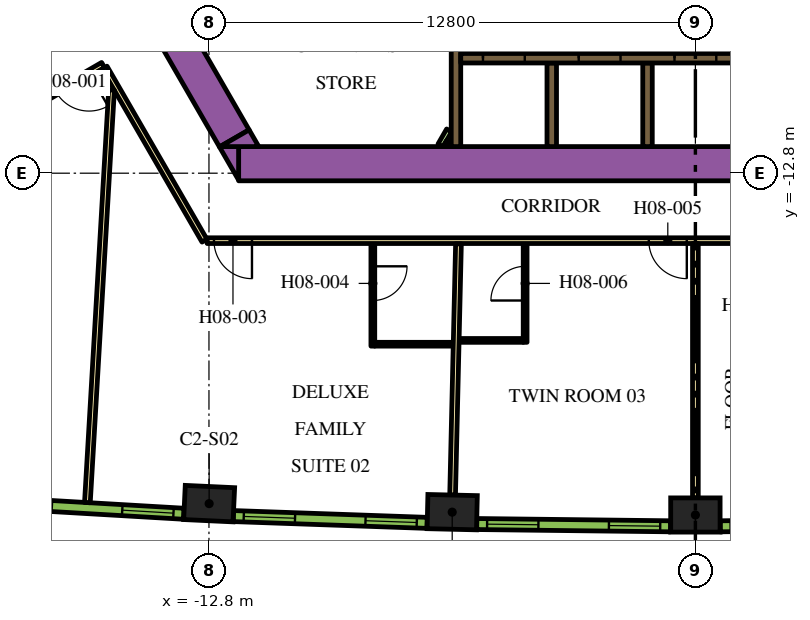
"""IFC4 building model, lengths in metres.
Left out: names, types, materials, properties, quantities, classifications, styles, units other than length and angle.
Written with IfcOpenShell. Run it as: python <this file> out.ifc"""

import sys

from ifc_helpers import new_model, si_unit, direction, frame, frame_2d, origin, origin_2d, place, context, subcontext, project, spatial, polyline, rectangle, outline, extrude, element, fill, save


model = new_model("IFC4")
c1 = context("Model", 3, precision=1e-05, world=origin(), true_north=direction((0.0, 1.0)))
c2 = subcontext(c1, "Body", "Model", "MODEL_VIEW")
j1 = project(units=[si_unit("LENGTHUNIT", "METRE"), si_unit("PLANEANGLEUNIT", "RADIAN")], contexts=[c1])
p1 = place(None, origin())
s1 = spatial("IfcSite", under=j1, at=p1, CompositionType="ELEMENT")
p2 = place(p1, origin())
s2 = spatial("IfcBuilding", under=s1, at=p2, CompositionType="ELEMENT")
p3 = place(p2, frame((0.0, 0.0, 114.9)))
s3 = spatial("IfcBuildingStorey", under=s2, at=p3, CompositionType="ELEMENT", Elevation=114.9)
for number, where, z_axis, x_axis in (
    (1, (-12.795, -21.494, 0.0), (0.0, 0.0, 1.0), (0.999, -0.047, 0.0)),
    (2, (-6.399, -21.719, 0.0), (0.0, 0.0, 1.0), (1.0, -0.023, 0.0)),
    (3, (0.0, -21.794, 0.0), (0.0, 0.0, 1.0), (1.0, 0.0, 0.0)),
):
    element("IfcColumn", number, at=place(p3, frame(where, z_axis=z_axis, x_axis=x_axis)), inside=s3, PredefinedType="COLUMN", context=c2, shape_type="SweptSolid", body=[
        extrude(rectangle(XDim=1.3, YDim=0.9, at=origin_2d()), origin(), (0.0, 0.0, 1.0), 3.9),
    ])
p4 = place(p3, frame((-12.019, -12.55, 0.0), z_axis=(0.0, 0.0, 1.0), x_axis=(1.0, 0.0, 0.0)))
e4 = element("IfcWall", 4, at=p4, inside=s3, PredefinedType="SOLIDWALL", context=c2, shape_type="SweptSolid", body=[
    extrude(rectangle(XDim=22.083, YDim=0.9, at=frame_2d((11.042, 0.0))), origin(), (0.0, 0.0, 1.0), 3.9),
])
p5 = place(p3, origin())
e5 = element("IfcWall", 5, at=p5, inside=s3, PredefinedType="SOLIDWALL", context=c2, shape_type="SweptSolid", body=[
    extrude(outline(polyline([(-12.529, -12.1), (-12.021, -12.1), (-12.021, -12.98), (-12.529, -12.1)])), origin(), (0.0, 0.0, 1.0), 3.9),
])
p6 = place(p3, frame((-12.134, -11.883, 0.0), z_axis=(0.0, 0.0, 1.0), x_axis=(-0.500005339912, 0.866022320763, 0.0)))
e6 = element("IfcWall", 6, at=p6, inside=s3, PredefinedType="SOLIDWALL", context=c2, shape_type="SweptSolid", body=[
    extrude(rectangle(XDim=9.488, YDim=0.9, at=frame_2d((4.744, 0.0))), origin(), (0.0, 0.0, 1.0), 3.9),
])
e7 = element("IfcWall", 7, at=p5, inside=s3, PredefinedType="SOLIDWALL", context=c2, shape_type="SweptSolid", body=[
    extrude(outline(polyline([(-11.489, -12.1), (-12.505, -12.1), (-11.743, -11.66), (-11.489, -12.1)])), origin(), (0.0, 0.0, 1.0), 3.9),
])
p7 = place(p3, frame((-3.78, -12.1, 0.0), z_axis=(0.0, 0.0, 1.0), x_axis=(0.0, 1.0, 0.0)))
e8 = element("IfcWall", 8, at=p7, inside=s3, PredefinedType="SOLIDWALL", context=c2, shape_type="SweptSolid", body=[
    extrude(rectangle(XDim=2.2, YDim=0.25, at=frame_2d((1.1, 0.0))), origin(), (0.0, 0.0, 1.0), 3.9),
])
p8 = place(p3, frame((-6.3, -12.1, 0.0), z_axis=(0.0, 0.0, 1.0), x_axis=(0.0, 1.0, 0.0)))
e9 = element("IfcWall", 9, at=p8, inside=s3, PredefinedType="SOLIDWALL", context=c2, shape_type="SweptSolid", body=[
    extrude(rectangle(XDim=3.146, YDim=0.25, at=frame_2d((1.573, 0.0))), origin(), (0.0, 0.0, 1.0), 3.9),
])
p9 = place(p3, frame((-1.26, -12.1, 0.0), z_axis=(0.0, 0.0, 1.0), x_axis=(0.0, 1.0, 0.0)))
e10 = element("IfcWall", 10, at=p9, inside=s3, PredefinedType="SOLIDWALL", context=c2, shape_type="SweptSolid", body=[
    extrude(rectangle(XDim=2.2, YDim=0.25, at=frame_2d((1.1, 0.0))), origin(), (0.0, 0.0, 1.0), 3.9),
])
p10 = place(p3, frame((-6.708, -12.068, 0.0), z_axis=(0.0, 0.0, 1.0), x_axis=(0.500000789788, 0.8660249478, 0.0)))
e11 = element("IfcWall", 11, at=p10, inside=s3, PredefinedType="PARTITIONING", context=c2, shape_type="SweptSolid", body=[
    extrude(rectangle(XDim=0.456, YDim=0.15, at=frame_2d((0.228, 0.0))), origin(), (0.0, 0.0, 1.0), 2.75),
])
p11 = place(p3, frame((-6.534, -12.068, 0.0), z_axis=(0.0, 0.0, 1.0), x_axis=(0.500240224089, 0.865886665912, 0.0)))
e12 = element("IfcWall", 12, at=p11, inside=s3, PredefinedType="PARTITIONING", context=c2, shape_type="SweptSolid", body=[
    extrude(rectangle(XDim=0.109, YDim=0.15, at=frame_2d((0.054, 0.0))), origin(), (0.0, 0.0, 1.0), 2.75),
])
p12 = place(p3, frame((-6.175, -9.775, 0.0), z_axis=(0.0, 0.0, 1.0), x_axis=(1.0, 0.0, 0.0)))
e13 = element("IfcWall", 13, at=p12, inside=s3, PredefinedType="SOLIDWALL", context=c2, shape_type="SweptSolid", body=[
    extrude(rectangle(XDim=12.35, YDim=0.25, at=frame_2d((6.175, 0.0))), origin(), (0.0, 0.0, 1.0), 3.9),
])
p13 = place(p12, frame((0.585, 0.0, 0.0)))
e14 = element("IfcOpeningElement", 14, at=p13, cuts=e13, PredefinedType="OPENING", context=c2, shape_type="SweptSolid", body=[
    extrude(rectangle(XDim=1.1, YDim=2.1, at=frame_2d((0.55, 1.05))), frame((0.0, 0.135, 0.0), z_axis=(0.0, -1.0, 0.0), x_axis=(1.0, 0.0, 0.0)), (0.0, 0.0, 1.0), 0.27),
])
p14 = place(p12, frame((3.105, 0.0, 0.0)))
e15 = element("IfcOpeningElement", 15, at=p14, cuts=e13, PredefinedType="OPENING", context=c2, shape_type="SweptSolid", body=[
    extrude(rectangle(XDim=1.1, YDim=2.1, at=frame_2d((0.55, 1.05))), frame((0.0, 0.135, 0.0), z_axis=(0.0, -1.0, 0.0), x_axis=(1.0, 0.0, 0.0)), (0.0, 0.0, 1.0), 0.27),
])
p15 = place(p12, frame((5.625, 0.0, 0.0)))
e16 = element("IfcOpeningElement", 16, at=p15, cuts=e13, PredefinedType="OPENING", context=c2, shape_type="SweptSolid", body=[
    extrude(rectangle(XDim=1.1, YDim=2.1, at=frame_2d((0.55, 1.05))), frame((0.0, 0.135, 0.0), z_axis=(0.0, -1.0, 0.0), x_axis=(1.0, 0.0, 0.0)), (0.0, 0.0, 1.0), 0.27),
])
p16 = place(p12, frame((8.145, 0.0, 0.0)))
e17 = element("IfcOpeningElement", 17, at=p16, cuts=e13, PredefinedType="OPENING", context=c2, shape_type="SweptSolid", body=[
    extrude(rectangle(XDim=1.1, YDim=2.1, at=frame_2d((0.55, 1.05))), frame((0.0, 0.135, 0.0), z_axis=(0.0, -1.0, 0.0), x_axis=(1.0, 0.0, 0.0)), (0.0, 0.0, 1.0), 0.27),
])
p17 = place(p12, frame((10.665, 0.0, 0.0)))
e18 = element("IfcOpeningElement", 18, at=p17, cuts=e13, PredefinedType="OPENING", context=c2, shape_type="SweptSolid", body=[
    extrude(rectangle(XDim=1.1, YDim=2.1, at=frame_2d((0.55, 1.05))), frame((0.0, 0.135, 0.0), z_axis=(0.0, -1.0, 0.0), x_axis=(1.0, 0.0, 0.0)), (0.0, 0.0, 1.0), 0.27),
])
p18 = place(p3, frame((-28.211, -15.335, 0.0), z_axis=(0.0, 0.0, 1.0), x_axis=(0.866025884867, 0.49999916674, 0.0)))
e19 = element("IfcWall", 19, at=p18, inside=s3, PredefinedType="PARTITIONING", context=c2, shape_type="SweptSolid", body=[
    extrude(rectangle(XDim=13.543, YDim=0.15, at=frame_2d((6.772, 0.0))), origin(), (0.0, 0.0, 1.0), 2.75),
])
p19 = place(p18, frame((12.114, 0.0, 0.0)))
e20 = element("IfcOpeningElement", 20, at=p19, cuts=e19, PredefinedType="OPENING", context=c2, shape_type="SweptSolid", body=[
    extrude(rectangle(XDim=1.1, YDim=2.1, at=frame_2d((0.55, 1.05))), frame((0.0, 0.085, 0.0), z_axis=(0.0, -1.0, 0.0), x_axis=(1.0, 0.0, 0.0)), (0.0, 0.0, 1.0), 0.17),
])
p20 = place(p18, frame((4.65, 0.0, 0.0)))
e21 = element("IfcOpeningElement", 21, at=p20, cuts=e19, PredefinedType="OPENING", context=c2, shape_type="SweptSolid", body=[
    extrude(rectangle(XDim=1.0, YDim=2.1, at=frame_2d((0.5, 1.05))), frame((0.0, 0.085, 0.0), z_axis=(0.0, -1.0, 0.0), x_axis=(1.0, 0.0, 0.0)), (0.0, 0.0, 1.0), 0.17),
])
p21 = place(p3, frame((-15.587, -9.952, 0.0), z_axis=(0.0, 0.0, 1.0), x_axis=(-0.866017869832, -0.500013048961, 0.0)))
e22 = element("IfcWall", 22, at=p21, inside=s3, PredefinedType="PARTITIONING", context=c2, shape_type="SweptSolid", body=[
    extrude(rectangle(XDim=13.624, YDim=0.15, at=frame_2d((6.812, 0.0))), origin(), (0.0, 0.0, 1.0), 2.75),
])
p22 = place(p21, frame((0.427, 0.0, 0.0)))
e23 = element("IfcOpeningElement", 23, at=p22, cuts=e22, PredefinedType="OPENING", context=c2, shape_type="SweptSolid", body=[
    extrude(rectangle(XDim=1.0, YDim=2.1, at=frame_2d((0.5, 1.05))), frame((0.0, 0.085, 0.0), z_axis=(0.0, -1.0, 0.0), x_axis=(1.0, 0.0, 0.0)), (0.0, 0.0, 1.0), 0.17),
])
p23 = place(p3, frame((-12.918, -14.575, 0.0), z_axis=(0.0, 0.0, 1.0), x_axis=(-0.500009150678, 0.866020120573, 0.0)))
e24 = element("IfcWall", 24, at=p23, inside=s3, PredefinedType="PARTITIONING", context=c2, shape_type="SweptSolid", body=[
    extrude(rectangle(XDim=5.258, YDim=0.15, at=frame_2d((2.629, 0.0))), origin(), (0.0, 0.0, 1.0), 2.75),
])
p24 = place(p3, frame((12.918, -14.575, 0.0), z_axis=(0.0, 0.0, 1.0), x_axis=(-1.0, 0.0, 0.0)))
e25 = element("IfcWall", 25, at=p24, inside=s3, PredefinedType="PARTITIONING", context=c2, shape_type="SweptSolid", body=[
    extrude(rectangle(XDim=25.766, YDim=0.15, at=frame_2d((12.883, 0.0))), origin(), (0.0, 0.0, 1.0), 2.75),
])
p25 = place(p24, frame((24.586, 0.0, 0.0)))
e26 = element("IfcOpeningElement", 26, at=p25, cuts=e25, PredefinedType="OPENING", context=c2, shape_type="SweptSolid", body=[
    extrude(rectangle(XDim=1.0, YDim=2.1, at=frame_2d((0.5, 1.05))), frame((0.0, 0.085, 0.0), z_axis=(0.0, -1.0, 0.0), x_axis=(1.0, 0.0, 0.0)), (0.0, 0.0, 1.0), 0.17),
])
p26 = place(p24, frame((13.144, 0.0, 0.0)))
e27 = element("IfcOpeningElement", 27, at=p26, cuts=e25, PredefinedType="OPENING", context=c2, shape_type="SweptSolid", body=[
    extrude(rectangle(XDim=1.0, YDim=2.1, at=frame_2d((0.5, 1.05))), frame((0.0, 0.085, 0.0), z_axis=(0.0, -1.0, 0.0), x_axis=(1.0, 0.0, 0.0)), (0.0, 0.0, 1.0), 0.17),
])
p27 = place(p24, frame((10.874, 0.0, 0.0)))
e28 = element("IfcOpeningElement", 28, at=p27, cuts=e25, PredefinedType="OPENING", context=c2, shape_type="SweptSolid", body=[
    extrude(rectangle(XDim=0.9, YDim=2.1, at=frame_2d((0.45, 1.05))), frame((0.0, 0.085, 0.0), z_axis=(0.0, -1.0, 0.0), x_axis=(1.0, 0.0, 0.0)), (0.0, 0.0, 1.0), 0.17),
])
p28 = place(p24, frame((0.596, 0.0, 0.0)))
e29 = element("IfcOpeningElement", 29, at=p28, cuts=e25, PredefinedType="OPENING", context=c2, shape_type="SweptSolid", body=[
    extrude(rectangle(XDim=1.0, YDim=2.1, at=frame_2d((0.5, 1.05))), frame((0.0, 0.085, 0.0), z_axis=(0.0, -1.0, 0.0), x_axis=(1.0, 0.0, 0.0)), (0.0, 0.0, 1.0), 0.17),
])
p29 = place(p3, frame((-15.999, -21.467, 0.0), z_axis=(0.0, 0.0, 1.0), x_axis=(0.058411453297, 0.998292593443, 0.0)))
e30 = element("IfcWall", 30, at=p29, inside=s3, PredefinedType="PARTITIONING", context=c2, shape_type="SweptSolid", body=[
    extrude(rectangle(XDim=10.875, YDim=0.15, at=frame_2d((5.438, 0.0))), origin(), (0.0, 0.0, 1.0), 2.75),
])
p30 = place(p3, frame((-6.389, -21.269, 0.0), z_axis=(0.0, 0.0, 1.0), x_axis=(0.023377429176, 0.999726710559, 0.0)))
e31 = element("IfcWall", 31, at=p30, inside=s3, PredefinedType="PARTITIONING", context=c2, shape_type="SweptSolid", body=[
    extrude(rectangle(XDim=6.611, YDim=0.15, at=frame_2d((3.305, 0.0))), origin(), (0.0, 0.0, 1.0), 2.75),
])
p31 = place(p3, frame((0.0, -21.344, 0.0), z_axis=(0.0, 0.0, 1.0), x_axis=(0.0, 1.0, 0.0)))
e32 = element("IfcWall", 32, at=p31, inside=s3, PredefinedType="PARTITIONING", context=c2, shape_type="SweptSolid", body=[
    extrude(rectangle(XDim=6.694, YDim=0.15, at=frame_2d((3.347, 0.0))), origin(), (0.0, 0.0, 1.0), 2.75),
])
p32 = place(p3, frame((-8.488, -14.65, 0.0), z_axis=(0.0, 0.0, 1.0), x_axis=(0.0, -1.0, 0.0)))
e33 = element("IfcWall", 33, at=p32, inside=s3, PredefinedType="PARTITIONING", context=c2, shape_type="SweptSolid", body=[
    extrude(rectangle(XDim=2.7, YDim=0.1, at=frame_2d((1.35, 0.0))), origin(), (0.0, 0.0, 1.0), 2.75),
])
p33 = place(p32, frame((0.6, 0.0, 0.0)))
e34 = element("IfcOpeningElement", 34, at=p33, cuts=e33, PredefinedType="OPENING", context=c2, shape_type="SweptSolid", body=[
    extrude(rectangle(XDim=0.9, YDim=2.1, at=frame_2d((0.45, 1.05))), frame((0.0, 0.06, 0.0), z_axis=(0.0, -1.0, 0.0), x_axis=(1.0, 0.0, 0.0)), (0.0, 0.0, 1.0), 0.12),
])
p34 = place(p3, frame((-8.438, -17.3, 0.0), z_axis=(0.0, 0.0, 1.0), x_axis=(1.0, 0.0, 0.0)))
e35 = element("IfcWall", 35, at=p34, inside=s3, PredefinedType="PARTITIONING", context=c2, shape_type="SweptSolid", body=[
    extrude(rectangle(XDim=2.06, YDim=0.1, at=frame_2d((1.03, 0.0))), origin(), (0.0, 0.0, 1.0), 2.75),
])
p35 = place(p3, frame((-4.48, -17.25, 0.0), z_axis=(0.0, 0.0, 1.0), x_axis=(0.0, 1.0, 0.0)))
e36 = element("IfcWall", 36, at=p35, inside=s3, PredefinedType="PARTITIONING", context=c2, shape_type="SweptSolid", body=[
    extrude(rectangle(XDim=2.6, YDim=0.1, at=frame_2d((1.3, 0.0))), origin(), (0.0, 0.0, 1.0), 2.75),
])
p36 = place(p35, frame((1.1, 0.0, 0.0)))
e37 = element("IfcOpeningElement", 37, at=p36, cuts=e36, PredefinedType="OPENING", context=c2, shape_type="SweptSolid", body=[
    extrude(rectangle(XDim=0.9, YDim=2.1, at=frame_2d((0.45, 1.05))), frame((0.0, 0.06, 0.0), z_axis=(0.0, -1.0, 0.0), x_axis=(1.0, 0.0, 0.0)), (0.0, 0.0, 1.0), 0.12),
])
p37 = place(p3, frame((-4.53, -17.2, 0.0), z_axis=(0.0, 0.0, 1.0), x_axis=(-1.0, 0.0, 0.0)))
e38 = element("IfcWall", 38, at=p37, inside=s3, PredefinedType="PARTITIONING", context=c2, shape_type="SweptSolid", body=[
    extrude(rectangle(XDim=1.68, YDim=0.1, at=frame_2d((0.84, 0.0))), origin(), (0.0, 0.0, 1.0), 2.75),
])
p38 = place(p3, frame((-18.553, -21.463, 0.0), z_axis=(0.0, 0.0, 1.0), x_axis=(0.998290511436, -0.058447025388, 0.0)))
e39 = element("IfcWall", 39, at=p38, inside=s3, PredefinedType="SOLIDWALL", context=c2, shape_type="SweptSolid", body=[
    extrude(rectangle(XDim=5.1, YDim=0.29, at=frame_2d((2.55, 0.0))), origin(), (0.0, 0.0, 1.0), 3.65),
])
p39 = place(p38, frame((0.273, 0.0, 0.9)))
e40 = element("IfcOpeningElement", 40, at=p39, cuts=e39, PredefinedType="OPENING", context=c2, shape_type="SweptSolid", body=[
    extrude(rectangle(XDim=1.35, YDim=2.15, at=frame_2d((0.675, 1.075))), frame((0.0, 0.155, 0.0), z_axis=(0.0, -1.0, 0.0), x_axis=(1.0, 0.0, 0.0)), (0.0, 0.0, 1.0), 0.31),
])
p40 = place(p38, frame((3.478, 0.0, 0.9)))
e41 = element("IfcOpeningElement", 41, at=p40, cuts=e39, PredefinedType="OPENING", context=c2, shape_type="SweptSolid", body=[
    extrude(rectangle(XDim=1.35, YDim=2.15, at=frame_2d((0.675, 1.075))), frame((0.0, 0.155, 0.0), z_axis=(0.0, -1.0, 0.0), x_axis=(1.0, 0.0, 0.0)), (0.0, 0.0, 1.0), 0.31),
])
p41 = place(p3, frame((-12.157, -21.822, 0.0), z_axis=(0.0, 0.0, 1.0), x_axis=(0.999385993957, -0.035037623812, 0.0)))
e42 = element("IfcWall", 42, at=p41, inside=s3, PredefinedType="SOLIDWALL", context=c2, shape_type="SweptSolid", body=[
    extrude(rectangle(XDim=5.101, YDim=0.29, at=frame_2d((2.55, 0.0))), origin(), (0.0, 0.0, 1.0), 3.65),
])
p42 = place(p41, frame((0.273, 0.0, 0.9)))
e43 = element("IfcOpeningElement", 43, at=p42, cuts=e42, PredefinedType="OPENING", context=c2, shape_type="SweptSolid", body=[
    extrude(rectangle(XDim=1.35, YDim=2.15, at=frame_2d((0.675, 1.075))), frame((0.0, 0.155, 0.0), z_axis=(0.0, -1.0, 0.0), x_axis=(1.0, 0.0, 0.0)), (0.0, 0.0, 1.0), 0.31),
])
p43 = place(p41, frame((3.478, 0.0, 0.9)))
e44 = element("IfcOpeningElement", 44, at=p43, cuts=e42, PredefinedType="OPENING", context=c2, shape_type="SweptSolid", body=[
    extrude(rectangle(XDim=1.35, YDim=2.15, at=frame_2d((0.675, 1.075))), frame((0.0, 0.155, 0.0), z_axis=(0.0, -1.0, 0.0), x_axis=(1.0, 0.0, 0.0)), (0.0, 0.0, 1.0), 0.31),
])
p44 = place(p3, frame((-5.753, -22.031, 0.0), z_axis=(0.0, 0.0, 1.0), x_axis=(0.999931786565, -0.011679992145, 0.0)))
e45 = element("IfcWall", 45, at=p44, inside=s3, PredefinedType="SOLIDWALL", context=c2, shape_type="SweptSolid", body=[
    extrude(rectangle(XDim=5.1, YDim=0.29, at=frame_2d((2.55, 0.0))), origin(), (0.0, 0.0, 1.0), 3.65),
])
p45 = place(p44, frame((0.272, 0.0, 0.9)))
e46 = element("IfcOpeningElement", 46, at=p45, cuts=e45, PredefinedType="OPENING", context=c2, shape_type="SweptSolid", body=[
    extrude(rectangle(XDim=1.35, YDim=2.15, at=frame_2d((0.675, 1.075))), frame((0.0, 0.155, 0.0), z_axis=(0.0, -1.0, 0.0), x_axis=(1.0, 0.0, 0.0)), (0.0, 0.0, 1.0), 0.31),
])
p46 = place(p44, frame((3.478, 0.0, 0.9)))
e47 = element("IfcOpeningElement", 47, at=p46, cuts=e45, PredefinedType="OPENING", context=c2, shape_type="SweptSolid", body=[
    extrude(rectangle(XDim=1.35, YDim=2.15, at=frame_2d((0.675, 1.075))), frame((0.0, 0.155, 0.0), z_axis=(0.0, -1.0, 0.0), x_axis=(1.0, 0.0, 0.0)), (0.0, 0.0, 1.0), 0.31),
])
p47 = place(p3, frame((0.653, -22.091, 0.0), z_axis=(0.0, 0.0, 1.0), x_axis=(0.999931786565, 0.011679992145, 0.0)))
e48 = element("IfcWall", 48, at=p47, inside=s3, PredefinedType="SOLIDWALL", context=c2, shape_type="SweptSolid", body=[
    extrude(rectangle(XDim=5.1, YDim=0.29, at=frame_2d((2.55, 0.0))), origin(), (0.0, 0.0, 1.0), 3.65),
])
p48 = place(p47, frame((0.273, 0.0, 0.9)))
e49 = element("IfcOpeningElement", 49, at=p48, cuts=e48, PredefinedType="OPENING", context=c2, shape_type="SweptSolid", body=[
    extrude(rectangle(XDim=1.35, YDim=2.15, at=frame_2d((0.675, 1.075))), frame((0.0, 0.155, 0.0), z_axis=(0.0, -1.0, 0.0), x_axis=(1.0, 0.0, 0.0)), (0.0, 0.0, 1.0), 0.31),
])
p49 = place(p47, frame((3.478, 0.0, 0.9)))
e50 = element("IfcOpeningElement", 50, at=p49, cuts=e48, PredefinedType="OPENING", context=c2, shape_type="SweptSolid", body=[
    extrude(rectangle(XDim=1.35, YDim=2.15, at=frame_2d((0.675, 1.075))), frame((0.0, 0.155, 0.0), z_axis=(0.0, -1.0, 0.0), x_axis=(1.0, 0.0, 0.0)), (0.0, 0.0, 1.0), 0.31),
])
p50 = place(p13, origin())
e51 = element("IfcDoor", 51, at=p50, inside=s3, OperationType="DOUBLE_DOOR_SLIDING", PredefinedType="DOOR", context=c2, shape_type="SweptSolid", body=[
    extrude(rectangle(XDim=1.1, YDim=2.1, at=frame_2d((0.55, 1.05))), frame((0.0, 0.025, 0.0), z_axis=(0.0, -1.0, 0.0), x_axis=(1.0, 0.0, 0.0)), (0.0, 0.0, 1.0), 0.05),
])
fill(e14, e51)
p51 = place(p14, origin())
e52 = element("IfcDoor", 52, at=p51, inside=s3, OperationType="DOUBLE_DOOR_SLIDING", PredefinedType="DOOR", context=c2, shape_type="SweptSolid", body=[
    extrude(rectangle(XDim=1.1, YDim=2.1, at=frame_2d((0.55, 1.05))), frame((0.0, 0.025, 0.0), z_axis=(0.0, -1.0, 0.0), x_axis=(1.0, 0.0, 0.0)), (0.0, 0.0, 1.0), 0.05),
])
fill(e15, e52)
p52 = place(p15, origin())
e53 = element("IfcDoor", 53, at=p52, inside=s3, OperationType="DOUBLE_DOOR_SLIDING", PredefinedType="DOOR", context=c2, shape_type="SweptSolid", body=[
    extrude(rectangle(XDim=1.1, YDim=2.1, at=frame_2d((0.55, 1.05))), frame((0.0, 0.025, 0.0), z_axis=(0.0, -1.0, 0.0), x_axis=(1.0, 0.0, 0.0)), (0.0, 0.0, 1.0), 0.05),
])
fill(e16, e53)
p53 = place(p22, origin())
e54 = element("IfcDoor", 54, at=p53, inside=s3, OperationType="SINGLE_SWING_LEFT", PredefinedType="DOOR", context=c2, shape_type="SweptSolid", body=[
    extrude(rectangle(XDim=1.0, YDim=2.1, at=frame_2d((0.5, 1.05))), frame((0.0, 0.025, 0.0), z_axis=(0.0, -1.0, 0.0), x_axis=(1.0, 0.0, 0.0)), (0.0, 0.0, 1.0), 0.05),
])
fill(e23, e54)
p54 = place(p25, origin())
e55 = element("IfcDoor", 55, at=p54, inside=s3, OperationType="SINGLE_SWING_RIGHT", PredefinedType="DOOR", context=c2, shape_type="SweptSolid", body=[
    extrude(rectangle(XDim=1.0, YDim=2.1, at=frame_2d((0.5, 1.05))), frame((0.0, 0.025, 0.0), z_axis=(0.0, -1.0, 0.0), x_axis=(1.0, 0.0, 0.0)), (0.0, 0.0, 1.0), 0.05),
])
fill(e26, e55)
p55 = place(p33, origin())
e56 = element("IfcDoor", 56, at=p55, inside=s3, OperationType="SINGLE_SWING_LEFT", PredefinedType="DOOR", context=c2, shape_type="SweptSolid", body=[
    extrude(rectangle(XDim=0.9, YDim=2.1, at=frame_2d((0.45, 1.05))), frame((0.0, 0.025, 0.0), z_axis=(0.0, -1.0, 0.0), x_axis=(1.0, 0.0, 0.0)), (0.0, 0.0, 1.0), 0.05),
])
fill(e34, e56)
p56 = place(p26, origin())
e57 = element("IfcDoor", 57, at=p56, inside=s3, OperationType="SINGLE_SWING_LEFT", PredefinedType="DOOR", context=c2, shape_type="SweptSolid", body=[
    extrude(rectangle(XDim=1.0, YDim=2.1, at=frame_2d((0.5, 1.05))), frame((0.0, 0.025, 0.0), z_axis=(0.0, -1.0, 0.0), x_axis=(1.0, 0.0, 0.0)), (0.0, 0.0, 1.0), 0.05),
])
fill(e27, e57)
p57 = place(p36, origin())
e58 = element("IfcDoor", 58, at=p57, inside=s3, OperationType="SINGLE_SWING_RIGHT", PredefinedType="DOOR", context=c2, shape_type="SweptSolid", body=[
    extrude(rectangle(XDim=0.9, YDim=2.1, at=frame_2d((0.45, 1.05))), frame((0.0, 0.025, 0.0), z_axis=(0.0, -1.0, 0.0), x_axis=(1.0, 0.0, 0.0)), (0.0, 0.0, 1.0), 0.05),
])
fill(e37, e58)
p58 = place(p40, origin())
e59 = element("IfcWindow", 59, at=p58, inside=s3, PartitioningType="DOUBLE_PANEL_VERTICAL", PredefinedType="WINDOW", context=c2, shape_type="SweptSolid", body=[
    extrude(rectangle(XDim=1.35, YDim=2.15, at=frame_2d((0.675, 1.075))), frame((0.0, 0.015, 0.0), z_axis=(0.0, -1.0, 0.0), x_axis=(1.0, 0.0, 0.0)), (0.0, 0.0, 1.0), 0.06),
])
fill(e41, e59)
p59 = place(p42, origin())
e60 = element("IfcWindow", 60, at=p59, inside=s3, PartitioningType="DOUBLE_PANEL_VERTICAL", PredefinedType="WINDOW", context=c2, shape_type="SweptSolid", body=[
    extrude(rectangle(XDim=1.35, YDim=2.15, at=frame_2d((0.675, 1.075))), frame((0.0, 0.015, 0.0), z_axis=(0.0, -1.0, 0.0), x_axis=(1.0, 0.0, 0.0)), (0.0, 0.0, 1.0), 0.06),
])
fill(e43, e60)
p60 = place(p43, origin())
e61 = element("IfcWindow", 61, at=p60, inside=s3, PartitioningType="DOUBLE_PANEL_VERTICAL", PredefinedType="WINDOW", context=c2, shape_type="SweptSolid", body=[
    extrude(rectangle(XDim=1.35, YDim=2.15, at=frame_2d((0.675, 1.075))), frame((0.0, 0.015, 0.0), z_axis=(0.0, -1.0, 0.0), x_axis=(1.0, 0.0, 0.0)), (0.0, 0.0, 1.0), 0.06),
])
fill(e44, e61)
p61 = place(p45, origin())
e62 = element("IfcWindow", 62, at=p61, inside=s3, PartitioningType="DOUBLE_PANEL_VERTICAL", PredefinedType="WINDOW", context=c2, shape_type="SweptSolid", body=[
    extrude(rectangle(XDim=1.35, YDim=2.15, at=frame_2d((0.675, 1.075))), frame((0.0, 0.015, 0.0), z_axis=(0.0, -1.0, 0.0), x_axis=(1.0, 0.0, 0.0)), (0.0, 0.0, 1.0), 0.06),
])
fill(e46, e62)
p62 = place(p46, origin())
e63 = element("IfcWindow", 63, at=p62, inside=s3, PartitioningType="DOUBLE_PANEL_VERTICAL", PredefinedType="WINDOW", context=c2, shape_type="SweptSolid", body=[
    extrude(rectangle(XDim=1.35, YDim=2.15, at=frame_2d((0.675, 1.075))), frame((0.0, 0.015, 0.0), z_axis=(0.0, -1.0, 0.0), x_axis=(1.0, 0.0, 0.0)), (0.0, 0.0, 1.0), 0.06),
])
fill(e47, e63)
save(model, sys.argv[1])
